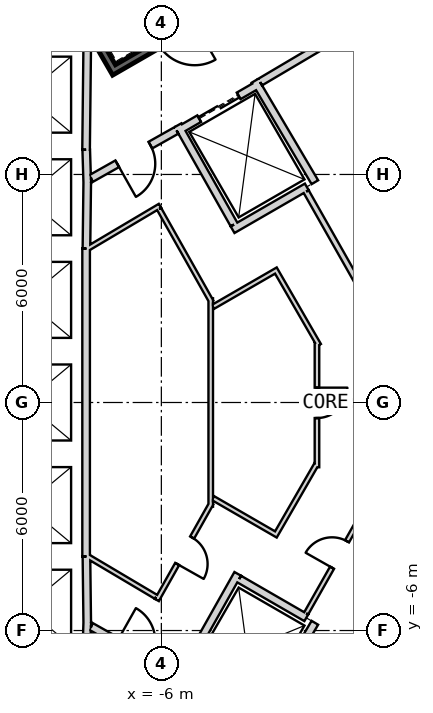
"""IFC4 building model, lengths in metres.
Left out: names, types, materials, properties, quantities, classifications, styles, units other than length and angle.
Written with IfcOpenShell. Run it as: python <this file> out.ifc"""

import sys

from ifc_helpers import new_model, si_unit, direction, frame, frame_2d, origin, place, context, subcontext, project, spatial, rectangle, extrude, element, fill, save


model = new_model("IFC4")
c1 = context("Model", 3, precision=1e-05, world=origin(), true_north=direction((0.0, 1.0)))
c2 = subcontext(c1, "Body", "Model", "MODEL_VIEW")
j1 = project(units=[si_unit("LENGTHUNIT", "METRE"), si_unit("PLANEANGLEUNIT", "RADIAN")], contexts=[c1])
p1 = place(None, origin())
s1 = spatial("IfcSite", under=j1, at=p1, CompositionType="ELEMENT")
p2 = place(p1, origin())
s2 = spatial("IfcBuilding", under=s1, at=p2, CompositionType="ELEMENT")
p3 = place(p2, frame((0.0, 0.0, 193.2)))
s3 = spatial("IfcBuildingStorey", under=s2, at=p3, CompositionType="ELEMENT", Elevation=193.2)
p4 = place(p3, frame((19.475, 2.208, 0.0), z_axis=(0.0, 0.0, 1.0), x_axis=(-0.866028369851, 0.499994862586, 0.0)))
e1 = element("IfcWall", 1, at=p4, inside=s3, PredefinedType="SHEAR", context=c2, shape_type="SweptSolid", body=[
    extrude(rectangle(XDim=31.523, YDim=0.9, at=frame_2d((15.762, 0.0))), origin(), (0.0, 0.0, 1.0), 4.0),
])
p5 = place(p4, frame((7.062, 0.0, 0.0)))
e2 = element("IfcOpeningElement", 2, at=p5, cuts=e1, PredefinedType="OPENING", context=c2, shape_type="SweptSolid", body=[
    extrude(rectangle(XDim=1.2, YDim=2.4, at=frame_2d((0.6, 1.2))), frame((0.0, 0.46, 0.0), z_axis=(0.0, -1.0, 0.0), x_axis=(1.0, 0.0, 0.0)), (0.0, 0.0, 1.0), 0.92),
])
p6 = place(p4, frame((3.612, 0.0, 0.0)))
e3 = element("IfcOpeningElement", 3, at=p6, cuts=e1, PredefinedType="OPENING", context=c2, shape_type="SweptSolid", body=[
    extrude(rectangle(XDim=1.2, YDim=2.4, at=frame_2d((0.6, 1.2))), frame((0.0, 0.46, 0.0), z_axis=(0.0, -1.0, 0.0), x_axis=(1.0, 0.0, 0.0)), (0.0, 0.0, 1.0), 0.92),
])
p7 = place(p4, frame((26.712, 0.0, 0.0)))
e4 = element("IfcOpeningElement", 4, at=p7, cuts=e1, PredefinedType="OPENING", context=c2, shape_type="SweptSolid", body=[
    extrude(rectangle(XDim=1.2, YDim=2.4, at=frame_2d((0.6, 1.2))), frame((0.0, 0.46, 0.0), z_axis=(0.0, -1.0, 0.0), x_axis=(1.0, 0.0, 0.0)), (0.0, 0.0, 1.0), 0.92),
])
p8 = place(p3, frame((-7.825, -17.97, 0.0), z_axis=(0.0, 0.0, 1.0), x_axis=(0.866028369851, 0.499994862586, 0.0)))
e5 = element("IfcWall", 5, at=p8, inside=s3, PredefinedType="SHEAR", context=c2, shape_type="SweptSolid", body=[
    extrude(rectangle(XDim=31.523, YDim=0.9, at=frame_2d((15.762, 0.0))), origin(), (0.0, 0.0, 1.0), 4.0),
])
p9 = place(p8, frame((7.062, 0.0, 0.0)))
e6 = element("IfcOpeningElement", 6, at=p9, cuts=e5, PredefinedType="OPENING", context=c2, shape_type="SweptSolid", body=[
    extrude(rectangle(XDim=1.2, YDim=2.4, at=frame_2d((0.6, 1.2))), frame((0.0, 0.46, 0.0), z_axis=(0.0, -1.0, 0.0), x_axis=(1.0, 0.0, 0.0)), (0.0, 0.0, 1.0), 0.92),
])
p10 = place(p8, frame((9.762, 0.0, 0.0)))
e7 = element("IfcOpeningElement", 7, at=p10, cuts=e5, PredefinedType="OPENING", context=c2, shape_type="SweptSolid", body=[
    extrude(rectangle(XDim=1.2, YDim=2.4, at=frame_2d((0.6, 1.2))), frame((0.0, 0.46, 0.0), z_axis=(0.0, -1.0, 0.0), x_axis=(1.0, 0.0, 0.0)), (0.0, 0.0, 1.0), 0.92),
])
p11 = place(p8, frame((12.462, 0.0, 0.0)))
e8 = element("IfcOpeningElement", 8, at=p11, cuts=e5, PredefinedType="OPENING", context=c2, shape_type="SweptSolid", body=[
    extrude(rectangle(XDim=1.2, YDim=2.4, at=frame_2d((0.6, 1.2))), frame((0.0, 0.46, 0.0), z_axis=(0.0, -1.0, 0.0), x_axis=(1.0, 0.0, 0.0)), (0.0, 0.0, 1.0), 0.92),
])
p12 = place(p8, frame((15.162, 0.0, 0.0)))
e9 = element("IfcOpeningElement", 9, at=p12, cuts=e5, PredefinedType="OPENING", context=c2, shape_type="SweptSolid", body=[
    extrude(rectangle(XDim=1.2, YDim=2.4, at=frame_2d((0.6, 1.2))), frame((0.0, 0.46, 0.0), z_axis=(0.0, -1.0, 0.0), x_axis=(1.0, 0.0, 0.0)), (0.0, 0.0, 1.0), 0.92),
])
p13 = place(p8, frame((17.862, 0.0, 0.0)))
e10 = element("IfcOpeningElement", 10, at=p13, cuts=e5, PredefinedType="OPENING", context=c2, shape_type="SweptSolid", body=[
    extrude(rectangle(XDim=1.2, YDim=2.4, at=frame_2d((0.6, 1.2))), frame((0.0, 0.46, 0.0), z_axis=(0.0, -1.0, 0.0), x_axis=(1.0, 0.0, 0.0)), (0.0, 0.0, 1.0), 0.92),
])
p14 = place(p8, frame((20.562, 0.0, 0.0)))
e11 = element("IfcOpeningElement", 11, at=p14, cuts=e5, PredefinedType="OPENING", context=c2, shape_type="SweptSolid", body=[
    extrude(rectangle(XDim=1.2, YDim=2.4, at=frame_2d((0.6, 1.2))), frame((0.0, 0.46, 0.0), z_axis=(0.0, -1.0, 0.0), x_axis=(1.0, 0.0, 0.0)), (0.0, 0.0, 1.0), 0.92),
])
p15 = place(p8, frame((26.712, 0.0, 0.0)))
e12 = element("IfcOpeningElement", 12, at=p15, cuts=e5, PredefinedType="OPENING", context=c2, shape_type="SweptSolid", body=[
    extrude(rectangle(XDim=1.2, YDim=2.4, at=frame_2d((0.6, 1.2))), frame((0.0, 0.46, 0.0), z_axis=(0.0, -1.0, 0.0), x_axis=(1.0, 0.0, 0.0)), (0.0, 0.0, 1.0), 0.92),
])
p16 = place(p8, frame((3.612, 0.0, 0.0)))
e13 = element("IfcOpeningElement", 13, at=p16, cuts=e5, PredefinedType="OPENING", context=c2, shape_type="SweptSolid", body=[
    extrude(rectangle(XDim=1.2, YDim=2.4, at=frame_2d((0.6, 1.2))), frame((0.0, 0.46, 0.0), z_axis=(0.0, -1.0, 0.0), x_axis=(1.0, 0.0, 0.0)), (0.0, 0.0, 1.0), 0.92),
])
p17 = place(p3, frame((-7.951, 9.35, 0.0), z_axis=(0.0, 0.0, 1.0), x_axis=(-0.011120469654, -0.999938165666, 0.0)))
e14 = element("IfcWall", 14, at=p17, inside=s3, PredefinedType="PLUMBINGWALL", context=c2, shape_type="SweptSolid", body=[
    extrude(rectangle(XDim=2.7, YDim=0.2, at=frame_2d((1.35, 0.0))), origin(), (0.0, 0.0, 1.0), 3.7),
])
p18 = place(p3, frame((-7.977, 6.65, 0.0), z_axis=(0.0, 0.0, 1.0), x_axis=(0.030861509705, -0.999523670164, 0.0)))
e15 = element("IfcWall", 15, at=p18, inside=s3, PredefinedType="PLUMBINGWALL", context=c2, shape_type="SweptSolid", body=[
    extrude(rectangle(XDim=0.878, YDim=0.2, at=frame_2d((0.439, 0.0))), origin(), (0.0, 0.0, 1.0), 3.7),
])
p19 = place(p3, frame((-7.949, 5.895, 0.0), z_axis=(0.0, 0.0, 1.0), x_axis=(-0.012042535896, -0.999927486035, 0.0)))
e16 = element("IfcWall", 16, at=p19, inside=s3, PredefinedType="PLUMBINGWALL", context=c2, shape_type="SweptSolid", body=[
    extrude(rectangle(XDim=1.845, YDim=0.2, at=frame_2d((0.922, 0.0))), origin(), (0.0, 0.0, 1.0), 3.7),
])
p20 = place(p3, frame((-7.98, 4.05, 0.0), z_axis=(0.0, 0.0, 1.0), x_axis=(0.0, -1.0, 0.0)))
e17 = element("IfcWall", 17, at=p20, inside=s3, PredefinedType="PLUMBINGWALL", context=c2, shape_type="SweptSolid", body=[
    extrude(rectangle(XDim=8.1, YDim=0.2, at=frame_2d((4.05, 0.0))), origin(), (0.0, 0.0, 1.0), 3.7),
])
p21 = place(p3, frame((-7.95, -5.772, 0.0), z_axis=(0.0, 0.0, 1.0), x_axis=(-0.030803413295, -0.999525462272, 0.0)))
e18 = element("IfcWall", 18, at=p21, inside=s3, PredefinedType="PLUMBINGWALL", context=c2, shape_type="SweptSolid", body=[
    extrude(rectangle(XDim=1.078, YDim=0.2, at=frame_2d((0.539, 0.0))), origin(), (0.0, 0.0, 1.0), 3.7),
])
p22 = place(p3, frame((-7.971, -4.05, 0.0), z_axis=(0.0, 0.0, 1.0), x_axis=(0.012042535896, -0.999927486035, 0.0)))
e19 = element("IfcWall", 19, at=p22, inside=s3, PredefinedType="PLUMBINGWALL", context=c2, shape_type="SweptSolid", body=[
    extrude(rectangle(XDim=1.845, YDim=0.2, at=frame_2d((0.922, 0.0))), origin(), (0.0, 0.0, 1.0), 3.7),
])
p23 = place(p3, frame((-11.245, 15.678, -0.3), z_axis=(0.0, 0.0, 1.0), x_axis=(0.499977274689, -0.866038523851, 0.0)))
e20 = element("IfcWall", 20, at=p23, inside=s3, PredefinedType="SHEAR", context=c2, shape_type="SweptSolid", body=[
    extrude(rectangle(XDim=8.1, YDim=0.2, at=frame_2d((4.05, 0.0))), origin(), (0.0, 0.0, 1.0), 4.0),
])
p24 = place(p3, frame((-7.159, 8.8, -0.3), z_axis=(0.0, 0.0, 1.0), x_axis=(0.866047807691, 0.499961193289, 0.0)))
e21 = element("IfcWall", 21, at=p24, inside=s3, PredefinedType="SHEAR", context=c2, shape_type="SweptSolid", body=[
    extrude(rectangle(XDim=3.6, YDim=0.2, at=frame_2d((1.8, 0.0))), origin(), (0.0, 0.0, 1.0), 4.0),
])
p25 = place(p24, frame((1.25, 0.0, 0.3)))
e22 = element("IfcOpeningElement", 22, at=p25, cuts=e21, PredefinedType="OPENING", context=c2, shape_type="SweptSolid", body=[
    extrude(rectangle(XDim=1.1, YDim=2.1, at=frame_2d((0.55, 1.05))), frame((0.0, 0.11, 0.0), z_axis=(0.0, -1.0, 0.0), x_axis=(1.0, 0.0, 0.0)), (0.0, 0.0, 1.0), 0.22),
])
p26 = place(p3, frame((-5.524, 7.168, 0.0), z_axis=(0.0, 0.0, 1.0), x_axis=(0.866024647952, 0.500001309137, 0.0)))
e23 = element("IfcWall", 23, at=p26, inside=s3, PredefinedType="PLUMBINGWALL", context=c2, shape_type="SweptSolid", body=[
    extrude(rectangle(XDim=2.4, YDim=0.2, at=frame_2d((1.2, 0.0))), origin(), (0.0, 0.0, 1.0), 3.7),
])
p27 = place(p26, frame((0.6, 0.0, 0.0)))
e24 = element("IfcOpeningElement", 24, at=p27, cuts=e23, PredefinedType="OPENING", context=c2, shape_type="SweptSolid", body=[
    extrude(rectangle(XDim=1.2, YDim=2.4, at=frame_2d((0.6, 1.2))), frame((0.0, 0.11, 0.0), z_axis=(0.0, -1.0, 0.0), x_axis=(1.0, 0.0, 0.0)), (0.0, 0.0, 1.0), 0.22),
])
p28 = place(p3, frame((-3.538, 8.465, 0.0), z_axis=(0.0, 0.0, 1.0), x_axis=(0.508647062354, -0.860975125052, 0.0)))
e25 = element("IfcWall", 25, at=p28, inside=s3, PredefinedType="PLUMBINGWALL", context=c2, shape_type="SweptSolid", body=[
    extrude(rectangle(XDim=3.1, YDim=0.2, at=frame_2d((1.55, 0.0))), origin(), (0.0, 0.0, 1.0), 3.7),
])
p29 = place(p3, frame((-2.173, 5.673, 0.0), z_axis=(0.0, 0.0, 1.0), x_axis=(-0.866028691075, -0.499994306202, 0.0)))
e26 = element("IfcWall", 26, at=p29, inside=s3, PredefinedType="PLUMBINGWALL", context=c2, shape_type="SweptSolid", body=[
    extrude(rectangle(XDim=2.254, YDim=0.2, at=frame_2d((1.127, 0.0))), origin(), (0.0, 0.0, 1.0), 3.7),
])
p30 = place(p3, frame((-5.562, 7.296, 0.0), z_axis=(0.0, 0.0, 1.0), x_axis=(0.49134651263, -0.870964180966, 0.0)))
e27 = element("IfcWall", 27, at=p30, inside=s3, PredefinedType="PLUMBINGWALL", context=c2, shape_type="SweptSolid", body=[
    extrude(rectangle(XDim=3.0, YDim=0.2, at=frame_2d((1.5, 0.0))), origin(), (0.0, 0.0, 1.0), 3.7),
])
p31 = place(p3, frame((-1.961, -5.796, 0.0), z_axis=(0.0, 0.0, 1.0), x_axis=(-0.508647062354, -0.860975125052, 0.0)))
e28 = element("IfcWall", 28, at=p31, inside=s3, PredefinedType="PLUMBINGWALL", context=c2, shape_type="SweptSolid", body=[
    extrude(rectangle(XDim=3.1, YDim=0.2, at=frame_2d((1.55, 0.0))), origin(), (0.0, 0.0, 1.0), 3.7),
])
p32 = place(p3, frame((-3.99, -4.509, 0.0), z_axis=(0.0, 0.0, 1.0), x_axis=(-0.491358283181, -0.870957540612, 0.0)))
e29 = element("IfcWall", 29, at=p32, inside=s3, PredefinedType="PLUMBINGWALL", context=c2, shape_type="SweptSolid", body=[
    extrude(rectangle(XDim=3.2, YDim=0.2, at=frame_2d((1.6, 0.0))), origin(), (0.0, 0.0, 1.0), 3.7),
])
p33 = place(p3, frame((-3.953, -4.646, 0.0), z_axis=(0.0, 0.0, 1.0), x_axis=(0.866032100247, -0.499988401207, 0.0)))
e30 = element("IfcWall", 30, at=p33, inside=s3, PredefinedType="PLUMBINGWALL", context=c2, shape_type="SweptSolid", body=[
    extrude(rectangle(XDim=2.04, YDim=0.2, at=frame_2d((1.02, 0.0))), origin(), (0.0, 0.0, 1.0), 3.7),
])
p34 = place(p3, frame((2.821, 7.586, 0.0), z_axis=(0.0, 0.0, 1.0), x_axis=(-0.869355227283, 0.494187706035, 0.0)))
e31 = element("IfcWall", 31, at=p34, inside=s3, PredefinedType="PLUMBINGWALL", context=c2, shape_type="SweptSolid", body=[
    extrude(rectangle(XDim=4.423, YDim=0.15, at=frame_2d((2.211, 0.0))), origin(), (0.0, 0.0, 1.0), 3.7),
])
p35 = place(p3, frame((-1.179, 9.745, 0.0), z_axis=(0.0, 0.0, 1.0), x_axis=(-0.860630814782, -0.509229418482, 0.0)))
e32 = element("IfcWall", 32, at=p35, inside=s3, PredefinedType="PARTITIONING", context=c2, shape_type="SweptSolid", body=[
    extrude(rectangle(XDim=2.582, YDim=0.2, at=frame_2d((1.291, 0.0))), origin(), (0.0, 0.0, 1.0), 3.7),
])
p36 = place(p3, frame((-5.6, 7.16, 0.0), z_axis=(0.0, 0.0, 1.0), x_axis=(-0.871363259478, -0.490638431059, 0.0)))
e33 = element("IfcWall", 33, at=p36, inside=s3, PredefinedType="PARTITIONING", context=c2, shape_type="SweptSolid", body=[
    extrude(rectangle(XDim=2.581, YDim=0.2, at=frame_2d((1.291, 0.0))), origin(), (0.0, 0.0, 1.0), 3.7),
])
p37 = place(p36, frame((0.791, 0.0, 0.0)))
e34 = element("IfcOpeningElement", 34, at=p37, cuts=e33, PredefinedType="OPENING", context=c2, shape_type="SweptSolid", body=[
    extrude(rectangle(XDim=1.0, YDim=2.1, at=frame_2d((0.5, 1.05))), frame((0.0, 0.11, 0.0), z_axis=(0.0, -1.0, 0.0), x_axis=(1.0, 0.0, 0.0)), (0.0, 0.0, 1.0), 0.22),
])
p38 = place(p3, frame((-7.849, -5.894, 0.0), z_axis=(0.0, 0.0, 1.0), x_axis=(0.871363259478, -0.490638431059, 0.0)))
e35 = element("IfcWall", 35, at=p38, inside=s3, PredefinedType="PARTITIONING", context=c2, shape_type="SweptSolid", body=[
    extrude(rectangle(XDim=2.581, YDim=0.2, at=frame_2d((1.291, 0.0))), origin(), (0.0, 0.0, 1.0), 3.7),
])
p39 = place(p38, frame((0.791, 0.0, 0.0)))
e36 = element("IfcOpeningElement", 36, at=p39, cuts=e35, PredefinedType="OPENING", context=c2, shape_type="SweptSolid", body=[
    extrude(rectangle(XDim=1.0, YDim=2.1, at=frame_2d((0.5, 1.05))), frame((0.0, 0.11, 0.0), z_axis=(0.0, -1.0, 0.0), x_axis=(1.0, 0.0, 0.0)), (0.0, 0.0, 1.0), 0.22),
])
p40 = place(p3, frame((-2.189, 5.549, 0.0), z_axis=(0.0, 0.0, 1.0), x_axis=(0.49303694679, -0.870008373006, 0.0)))
e37 = element("IfcWall", 37, at=p40, inside=s3, PredefinedType="PLUMBINGWALL", context=c2, shape_type="SweptSolid", body=[
    extrude(rectangle(XDim=3.538, YDim=0.15, at=frame_2d((1.769, 0.0))), origin(), (0.0, 0.0, 1.0), 3.7),
])
p41 = place(p3, frame((-0.383, -2.361, 0.0), z_axis=(0.0, 0.0, 1.0), x_axis=(-0.492992395315, -0.870033618983, 0.0)))
e38 = element("IfcWall", 38, at=p41, inside=s3, PredefinedType="PARTITIONING", context=c2, shape_type="SweptSolid", body=[
    extrude(rectangle(XDim=3.664, YDim=0.12, at=frame_2d((1.832, 0.0))), origin(), (0.0, 0.0, 1.0), 3.7),
])
p42 = place(p41, frame((1.483, 0.0, 0.0)))
e39 = element("IfcOpeningElement", 39, at=p42, cuts=e38, PredefinedType="OPENING", context=c2, shape_type="SweptSolid", body=[
    extrude(rectangle(XDim=0.8, YDim=2.1, at=frame_2d((0.4, 1.05))), frame((0.0, 0.07, 0.0), z_axis=(0.0, -1.0, 0.0), x_axis=(1.0, 0.0, 0.0)), (0.0, 0.0, 1.0), 0.14),
])
p43 = place(p3, frame((-4.701, -2.742, 0.0), z_axis=(0.0, 0.0, 1.0), x_axis=(0.0, 1.0, 0.0)))
e40 = element("IfcWall", 40, at=p43, inside=s3, PredefinedType="PARTITIONING", context=c2, shape_type="SweptSolid", body=[
    extrude(rectangle(XDim=5.484, YDim=0.12, at=frame_2d((2.742, 0.0))), origin(), (0.0, 0.0, 1.0), 3.7),
])
p44 = place(p3, frame((-6.118, -5.198, 0.0), z_axis=(0.0, 0.0, 1.0), x_axis=(0.491036167924, 0.871139186233, 0.0)))
e41 = element("IfcWall", 41, at=p44, inside=s3, PredefinedType="PARTITIONING", context=c2, shape_type="SweptSolid", body=[
    extrude(rectangle(XDim=2.916, YDim=0.12, at=frame_2d((1.458, 0.0))), origin(), (0.0, 0.0, 1.0), 3.7),
])
p45 = place(p44, frame((1.088, 0.0, 0.0)))
e42 = element("IfcOpeningElement", 42, at=p45, cuts=e41, PredefinedType="OPENING", context=c2, shape_type="SweptSolid", body=[
    extrude(rectangle(XDim=0.8, YDim=2.1, at=frame_2d((0.4, 1.05))), frame((0.0, 0.07, 0.0), z_axis=(0.0, -1.0, 0.0), x_axis=(1.0, 0.0, 0.0)), (0.0, 0.0, 1.0), 0.14),
])
p46 = place(p3, frame((-7.95, -4.041, 0.0), z_axis=(0.0, 0.0, 1.0), x_axis=(0.860112457103, -0.510104461004, 0.0)))
e43 = element("IfcWall", 43, at=p46, inside=s3, PredefinedType="PARTITIONING", context=c2, shape_type="SweptSolid", body=[
    extrude(rectangle(XDim=2.104, YDim=0.12, at=frame_2d((1.052, 0.0))), origin(), (0.0, 0.0, 1.0), 3.7),
])
p47 = place(p3, frame((-6.037, 5.176, 0.0), z_axis=(0.0, 0.0, 1.0), x_axis=(-0.860106072674, -0.510115225953, 0.0)))
e44 = element("IfcWall", 44, at=p47, inside=s3, PredefinedType="PARTITIONING", context=c2, shape_type="SweptSolid", body=[
    extrude(rectangle(XDim=2.225, YDim=0.12, at=frame_2d((1.112, 0.0))), origin(), (0.0, 0.0, 1.0), 3.7),
])
p48 = place(p3, frame((-4.686, 2.657, 0.0), z_axis=(0.0, 0.0, 1.0), x_axis=(-0.491052820648, 0.87112979936, 0.0)))
e45 = element("IfcWall", 45, at=p48, inside=s3, PredefinedType="PARTITIONING", context=c2, shape_type="SweptSolid", body=[
    extrude(rectangle(XDim=2.796, YDim=0.12, at=frame_2d((1.398, 0.0))), origin(), (0.0, 0.0, 1.0), 3.7),
])
p49 = place(p3, frame((-2.934, 3.502, 0.0), z_axis=(0.0, 0.0, 1.0), x_axis=(-0.866039121236, -0.499976239924, 0.0)))
e46 = element("IfcWall", 46, at=p49, inside=s3, PredefinedType="PARTITIONING", context=c2, shape_type="SweptSolid", body=[
    extrude(rectangle(XDim=1.971, YDim=0.12, at=frame_2d((0.985, 0.0))), origin(), (0.0, 0.0, 1.0), 3.7),
])
p50 = place(p3, frame((-1.853, 1.51, 0.0), z_axis=(0.0, 0.0, 1.0), x_axis=(-0.499984350684, 0.866034438732, 0.0)))
e47 = element("IfcWall", 47, at=p50, inside=s3, PredefinedType="PARTITIONING", context=c2, shape_type="SweptSolid", body=[
    extrude(rectangle(XDim=2.206, YDim=0.12, at=frame_2d((1.103, 0.0))), origin(), (0.0, 0.0, 1.0), 3.7),
])
p51 = place(p3, frame((-1.905, -1.704, 0.0), z_axis=(0.0, 0.0, 1.0), x_axis=(0.0, 1.0, 0.0)))
e48 = element("IfcWall", 48, at=p51, inside=s3, PredefinedType="PARTITIONING", context=c2, shape_type="SweptSolid", body=[
    extrude(rectangle(XDim=3.285, YDim=0.12, at=frame_2d((1.643, 0.0))), origin(), (0.0, 0.0, 1.0), 3.7),
])
p52 = place(p51, frame((1.295, 0.0, 0.0)))
e49 = element("IfcOpeningElement", 49, at=p52, cuts=e48, PredefinedType="OPENING", context=c2, shape_type="SweptSolid", body=[
    extrude(rectangle(XDim=0.8, YDim=2.1, at=frame_2d((0.4, 1.05))), frame((0.0, 0.07, 0.0), z_axis=(0.0, -1.0, 0.0), x_axis=(1.0, 0.0, 0.0)), (0.0, 0.0, 1.0), 0.14),
])
p53 = place(p3, frame((-3.016, -3.524, 0.0), z_axis=(0.0, 0.0, 1.0), x_axis=(0.499952654668, 0.866052736899, 0.0)))
e50 = element("IfcWall", 50, at=p53, inside=s3, PredefinedType="PARTITIONING", context=c2, shape_type="SweptSolid", body=[
    extrude(rectangle(XDim=2.203, YDim=0.12, at=frame_2d((1.102, 0.0))), origin(), (0.0, 0.0, 1.0), 3.7),
])
p54 = place(p3, frame((-4.641, -2.517, 0.0), z_axis=(0.0, 0.0, 1.0), x_axis=(0.866042797968, -0.49996987118, 0.0)))
e51 = element("IfcWall", 51, at=p54, inside=s3, PredefinedType="PARTITIONING", context=c2, shape_type="SweptSolid", body=[
    extrude(rectangle(XDim=1.851, YDim=0.12, at=frame_2d((0.925, 0.0))), origin(), (0.0, 0.0, 1.0), 3.7),
])
p55 = place(p37, origin())
e52 = element("IfcDoor", 52, at=p55, inside=s3, OperationType="SINGLE_SWING_LEFT", PredefinedType="USERDEFINED", context=c2, shape_type="SweptSolid", body=[
    extrude(rectangle(XDim=1.0, YDim=2.1, at=frame_2d((0.5, 1.05))), frame((0.0, 0.025, 0.0), z_axis=(0.0, -1.0, 0.0), x_axis=(1.0, 0.0, 0.0)), (0.0, 0.0, 1.0), 0.05),
])
fill(e34, e52)
p56 = place(p27, origin())
e53 = element("IfcDoor", 53, at=p56, inside=s3, OperationType="SLIDING_TO_LEFT", PredefinedType="USERDEFINED", context=c2, shape_type="SweptSolid", body=[
    extrude(rectangle(XDim=1.2, YDim=2.4, at=frame_2d((0.6, 1.2))), frame((0.0, 0.025, 0.0), z_axis=(0.0, -1.0, 0.0), x_axis=(1.0, 0.0, 0.0)), (0.0, 0.0, 1.0), 0.05),
])
fill(e24, e53)
p57 = place(p42, origin())
e54 = element("IfcDoor", 54, at=p57, inside=s3, OperationType="SINGLE_SWING_RIGHT", PredefinedType="USERDEFINED", context=c2, shape_type="SweptSolid", body=[
    extrude(rectangle(XDim=0.8, YDim=2.1, at=frame_2d((0.4, 1.05))), frame((0.0, 0.025, 0.0), z_axis=(0.0, -1.0, 0.0), x_axis=(1.0, 0.0, 0.0)), (0.0, 0.0, 1.0), 0.05),
])
fill(e39, e54)
p58 = place(p45, origin())
e55 = element("IfcDoor", 55, at=p58, inside=s3, OperationType="SINGLE_SWING_RIGHT", PredefinedType="USERDEFINED", context=c2, shape_type="SweptSolid", body=[
    extrude(rectangle(XDim=0.8, YDim=2.1, at=frame_2d((0.4, 1.05))), frame((0.0, 0.025, 0.0), z_axis=(0.0, -1.0, 0.0), x_axis=(1.0, 0.0, 0.0)), (0.0, 0.0, 1.0), 0.05),
])
fill(e42, e55)
p59 = place(p52, origin())
e56 = element("IfcDoor", 56, at=p59, inside=s3, OperationType="SINGLE_SWING_LEFT", PredefinedType="USERDEFINED", context=c2, shape_type="SweptSolid", body=[
    extrude(rectangle(XDim=0.8, YDim=2.1, at=frame_2d((0.4, 1.05))), frame((0.0, 0.025, 0.0), z_axis=(0.0, -1.0, 0.0), x_axis=(1.0, 0.0, 0.0)), (0.0, 0.0, 1.0), 0.05),
])
fill(e49, e56)
save(model, sys.argv[1])
